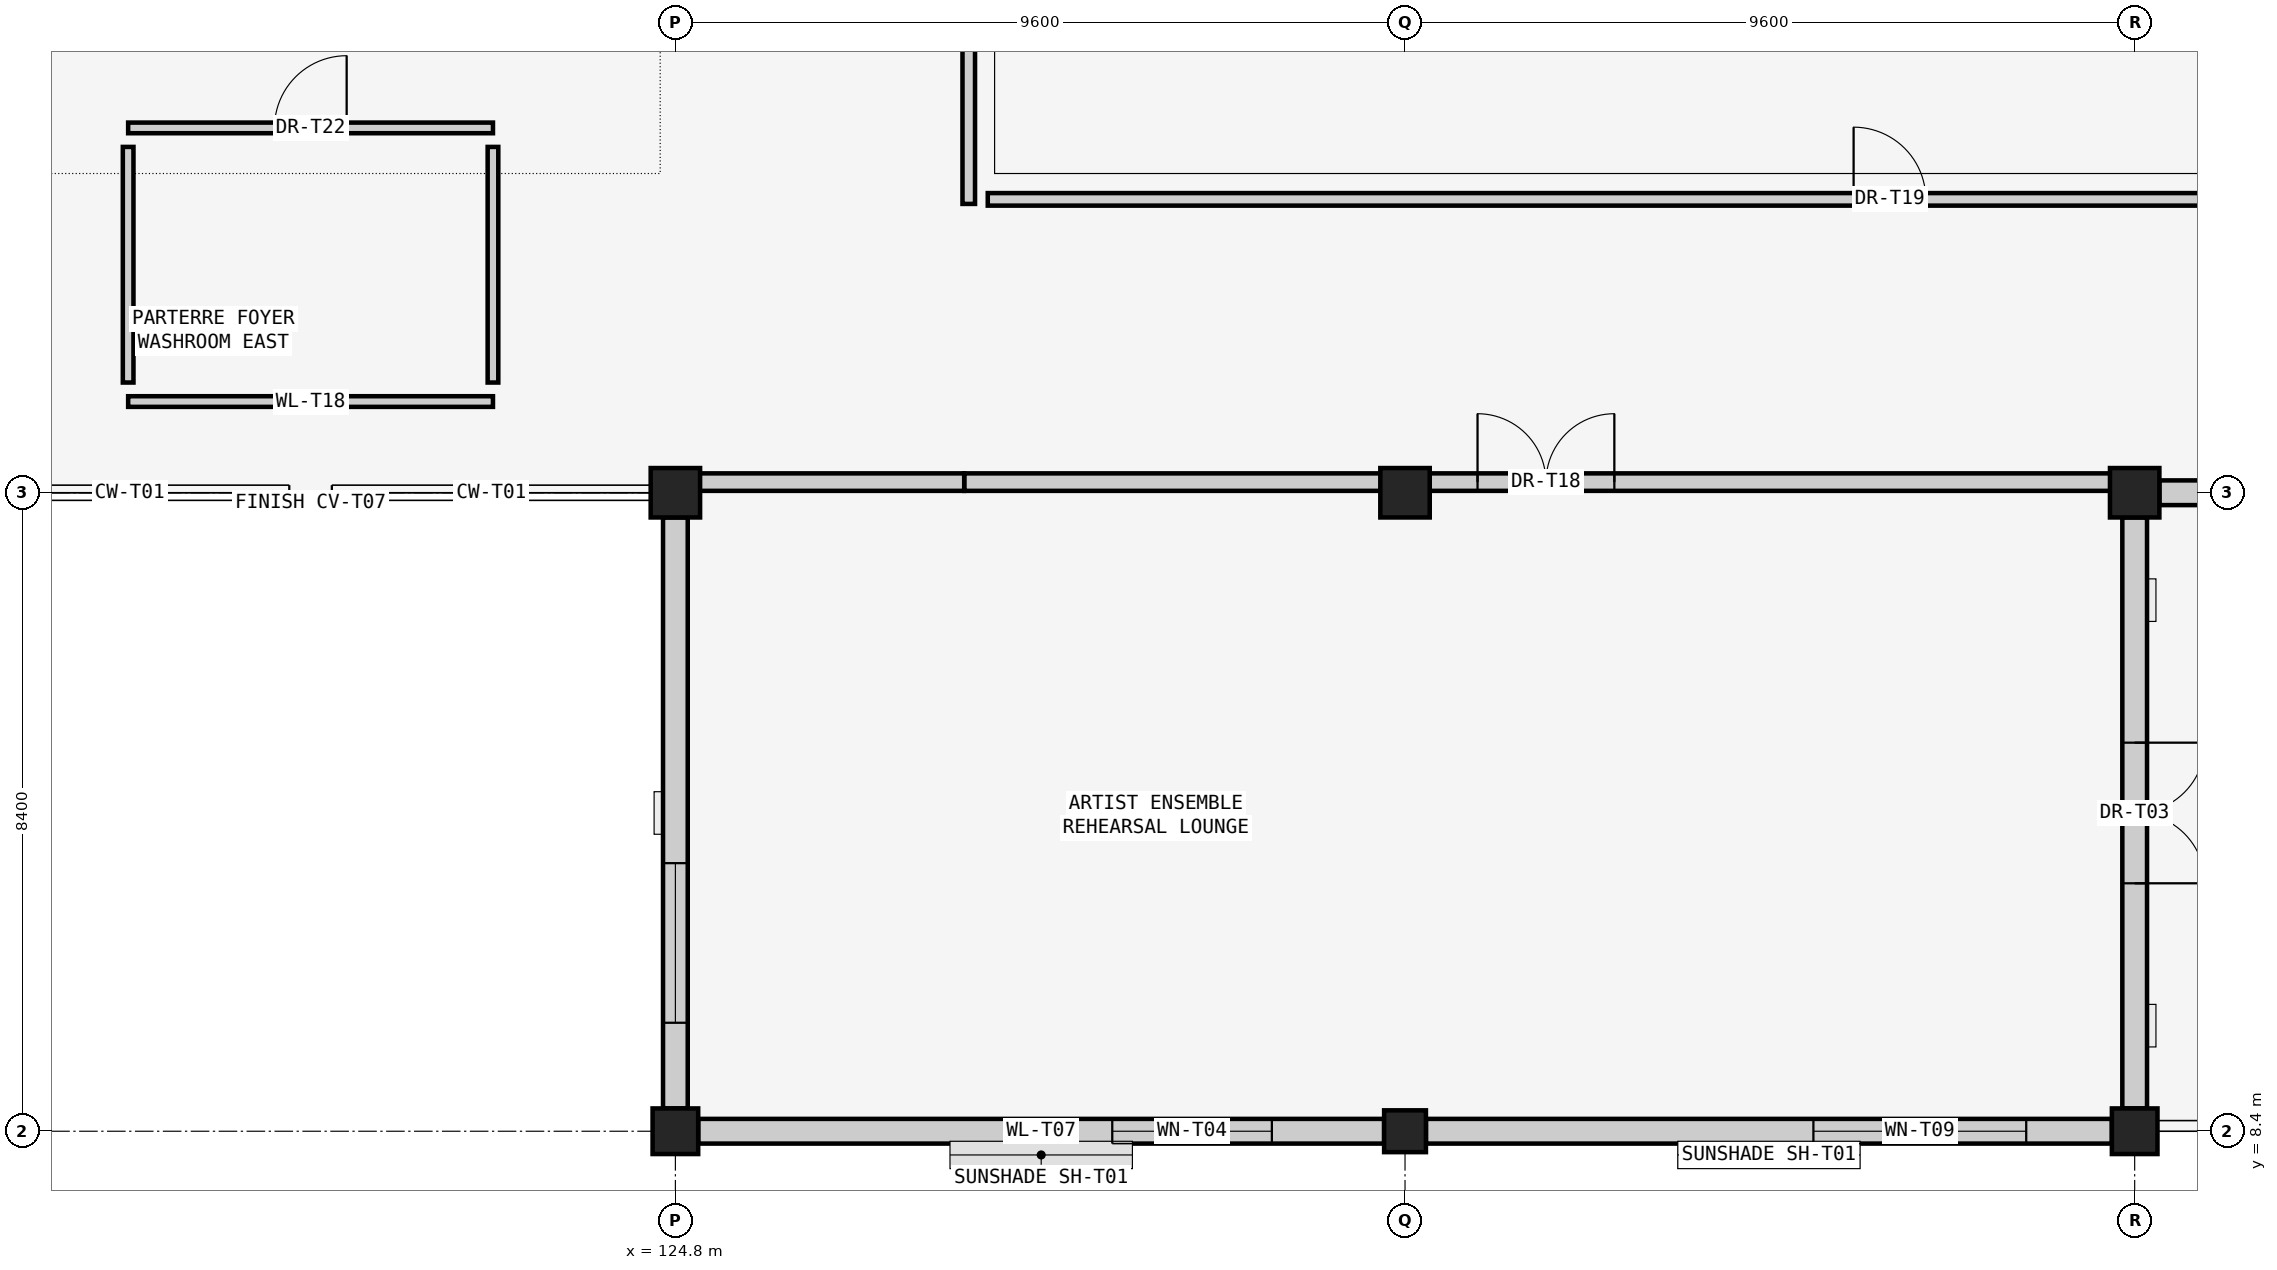
"""IFC4 building model, lengths in metres.
Left out: names, types, materials, properties, quantities, classifications, styles, units other than length and angle.
Written with IfcOpenShell. Run it as: python <this file> out.ifc"""

import sys

from ifc_helpers import new_model, si_unit, direction, frame, frame_2d, origin, origin_2d, place, context, subcontext, project, spatial, rectangle, extrude, element, fill, save


model = new_model("IFC4")
c1 = context("Model", 3, precision=1e-05, world=origin(), true_north=direction((0.0, 1.0)))
c2 = subcontext(c1, "Body", "Model", "MODEL_VIEW")
j1 = project(units=[si_unit("LENGTHUNIT", "METRE"), si_unit("PLANEANGLEUNIT", "RADIAN")], contexts=[c1])
p1 = place(None, origin())
s1 = spatial("IfcSite", under=j1, at=p1, CompositionType="ELEMENT")
p2 = place(p1, origin())
s2 = spatial("IfcBuilding", under=s1, at=p2, CompositionType="ELEMENT")
p3 = place(p2, frame((0.0, 0.0, 5.4)))
s3 = spatial("IfcBuildingStorey", under=s2, at=p3, CompositionType="ELEMENT", Elevation=5.4)
p4 = place(p3, frame((124.8, 8.4, 0.0), z_axis=(0.0, 0.0, 1.0), x_axis=(1.0, 0.0, 0.0)))
e1 = element("IfcColumn", 1, at=p4, inside=s3, PredefinedType="COLUMN", context=c2, shape_type="SweptSolid", body=[
    extrude(rectangle(XDim=0.6, YDim=0.6, at=origin_2d()), origin(), (0.0, 0.0, 1.0), 4.53),
])
p5 = place(p3, frame((124.8, 16.8, 0.0), z_axis=(0.0, 0.0, 1.0), x_axis=(1.0, 0.0, 0.0)))
e2 = element("IfcColumn", 2, at=p5, inside=s3, PredefinedType="COLUMN", context=c2, shape_type="SweptSolid", body=[
    extrude(rectangle(XDim=0.65, YDim=0.65, at=origin_2d()), origin(), (0.0, 0.0, 1.0), 4.53),
])
p6 = place(p3, frame((134.4, 8.4, 0.0), z_axis=(0.0, 0.0, 1.0), x_axis=(1.0, 0.0, 0.0)))
e3 = element("IfcColumn", 3, at=p6, inside=s3, PredefinedType="COLUMN", context=c2, shape_type="SweptSolid", body=[
    extrude(rectangle(XDim=0.55, YDim=0.55, at=origin_2d()), origin(), (0.0, 0.0, 1.0), 4.53),
])
p7 = place(p3, frame((134.4, 16.8, 0.0), z_axis=(0.0, 0.0, 1.0), x_axis=(1.0, 0.0, 0.0)))
e4 = element("IfcColumn", 4, at=p7, inside=s3, PredefinedType="COLUMN", context=c2, shape_type="SweptSolid", body=[
    extrude(rectangle(XDim=0.65, YDim=0.65, at=origin_2d()), origin(), (0.0, 0.0, 1.0), 4.53),
])
p8 = place(p3, frame((144.0, 8.4, 0.0), z_axis=(0.0, 0.0, 1.0), x_axis=(1.0, 0.0, 0.0)))
e5 = element("IfcColumn", 5, at=p8, inside=s3, PredefinedType="COLUMN", context=c2, shape_type="SweptSolid", body=[
    extrude(rectangle(XDim=0.6, YDim=0.6, at=origin_2d()), origin(), (0.0, 0.0, 1.0), 4.53),
])
p9 = place(p3, frame((144.0, 16.8, 0.0), z_axis=(0.0, 0.0, 1.0), x_axis=(1.0, 0.0, 0.0)))
e6 = element("IfcColumn", 6, at=p9, inside=s3, PredefinedType="PILASTER", context=c2, shape_type="SweptSolid", body=[
    extrude(rectangle(XDim=0.65, YDim=0.65, at=origin_2d()), origin(), (0.0, 0.0, 1.0), 4.53),
])
p10 = place(p3, frame((134.125, 8.4, 0.0), z_axis=(0.0, 0.0, 1.0), x_axis=(-1.0, 0.0, 0.0)))
e7 = element("IfcWall", 7, at=p10, inside=s3, PredefinedType="SOLIDWALL", context=c2, shape_type="SweptSolid", body=[
    extrude(rectangle(XDim=9.025, YDim=0.325, at=frame_2d((4.512, 0.0))), origin(), (0.0, 0.0, 1.0), 3.91),
])
p11 = place(p10, frame((1.477, 0.0, 0.9)))
e8 = element("IfcOpeningElement", 8, at=p11, cuts=e7, PredefinedType="OPENING", context=c2, shape_type="SweptSolid", body=[
    extrude(rectangle(XDim=2.1, YDim=2.4, at=frame_2d((1.05, 1.2))), frame((0.0, 0.172, 0.0), z_axis=(0.0, -1.0, 0.0), x_axis=(1.0, 0.0, 0.0)), (0.0, 0.0, 1.0), 0.345),
])
p12 = place(p3, frame((124.8, 8.7, 0.0), z_axis=(0.0, 0.0, 1.0), x_axis=(0.0, 1.0, 0.0)))
e9 = element("IfcWall", 9, at=p12, inside=s3, PredefinedType="SOLIDWALL", context=c2, shape_type="SweptSolid", body=[
    extrude(rectangle(XDim=7.775, YDim=0.325, at=frame_2d((3.888, 0.0))), origin(), (0.0, 0.0, 1.0), 3.91),
])
p13 = place(p12, frame((1.127, 0.0, 0.9)))
e10 = element("IfcOpeningElement", 10, at=p13, cuts=e9, PredefinedType="OPENING", context=c2, shape_type="SweptSolid", body=[
    extrude(rectangle(XDim=2.1, YDim=2.4, at=frame_2d((1.05, 1.2))), frame((0.0, 0.172, 0.0), z_axis=(0.0, -1.0, 0.0), x_axis=(1.0, 0.0, 0.0)), (0.0, 0.0, 1.0), 0.345),
])
p14 = place(p3, frame((143.7, 8.4, 0.0), z_axis=(0.0, 0.0, 1.0), x_axis=(-1.0, 0.0, 0.0)))
e11 = element("IfcWall", 11, at=p14, inside=s3, PredefinedType="SOLIDWALL", context=c2, shape_type="SweptSolid", body=[
    extrude(rectangle(XDim=9.025, YDim=0.325, at=frame_2d((4.512, 0.0))), origin(), (0.0, 0.0, 1.0), 3.91),
])
p15 = place(p14, frame((1.127, 0.0, 1.0)))
e12 = element("IfcOpeningElement", 12, at=p15, cuts=e11, PredefinedType="OPENING", context=c2, shape_type="SweptSolid", body=[
    extrude(rectangle(XDim=2.8, YDim=1.9, at=frame_2d((1.4, 0.95))), frame((0.0, 0.172, 0.0), z_axis=(0.0, -1.0, 0.0), x_axis=(1.0, 0.0, 0.0)), (0.0, 0.0, 1.0), 0.345),
])
p16 = place(p3, frame((144.0, 16.475, 0.0), z_axis=(0.0, 0.0, 1.0), x_axis=(0.0, -1.0, 0.0)))
e13 = element("IfcWall", 13, at=p16, inside=s3, PredefinedType="SOLIDWALL", context=c2, shape_type="SweptSolid", body=[
    extrude(rectangle(XDim=7.775, YDim=0.325, at=frame_2d((3.888, 0.0))), origin(), (0.0, 0.0, 1.0), 3.91),
])
p17 = place(p16, frame((2.963, 0.0, 0.0)))
e14 = element("IfcOpeningElement", 14, at=p17, cuts=e13, PredefinedType="OPENING", context=c2, shape_type="SweptSolid", body=[
    extrude(rectangle(XDim=1.85, YDim=2.3, at=frame_2d((0.925, 1.15))), frame((0.0, 0.172, 0.0), z_axis=(0.0, -1.0, 0.0), x_axis=(1.0, 0.0, 0.0)), (0.0, 0.0, 1.0), 0.345),
])
p18 = place(p3, frame((153.3, 16.8, 0.0), z_axis=(0.0, 0.0, 1.0), x_axis=(-1.0, 0.0, 0.0)))
e15 = element("IfcWall", 15, at=p18, inside=s3, PredefinedType="SOLIDWALL", context=c2, shape_type="SweptSolid", body=[
    extrude(rectangle(XDim=8.975, YDim=0.325, at=frame_2d((4.488, 0.0))), origin(), (0.0, 0.0, 1.0), 3.91),
])
p19 = place(p18, frame((3.562, 0.0, 0.0)))
e16 = element("IfcOpeningElement", 16, at=p19, cuts=e15, PredefinedType="OPENING", context=c2, shape_type="SweptSolid", body=[
    extrude(rectangle(XDim=1.85, YDim=2.3, at=frame_2d((0.925, 1.15))), frame((0.0, 0.172, 0.0), z_axis=(0.0, -1.0, 0.0), x_axis=(1.0, 0.0, 0.0)), (0.0, 0.0, 1.0), 0.345),
])
p20 = place(p3, frame((117.6, 18.0, 0.0), z_axis=(0.0, 0.0, 1.0), x_axis=(1.0, 0.0, 0.0)))
e17 = element("IfcWall", 17, at=p20, inside=s3, PredefinedType="PARTITIONING", context=c2, shape_type="SweptSolid", body=[
    extrude(rectangle(XDim=4.8, YDim=0.14, at=frame_2d((2.4, 0.0))), origin(), (0.0, 0.0, 1.0), 4.32),
])
p21 = place(p3, frame((117.6, 21.6, 0.0), z_axis=(0.0, 0.0, 1.0), x_axis=(1.0, 0.0, 0.0)))
e18 = element("IfcWall", 18, at=p21, inside=s3, PredefinedType="PARTITIONING", context=c2, shape_type="SweptSolid", body=[
    extrude(rectangle(XDim=4.8, YDim=0.14, at=frame_2d((2.4, 0.0))), origin(), (0.0, 0.0, 1.0), 4.32),
])
p22 = place(p21, frame((1.925, 0.0, 0.0)))
e19 = element("IfcOpeningElement", 19, at=p22, cuts=e18, PredefinedType="OPENING", context=c2, shape_type="SweptSolid", body=[
    extrude(rectangle(XDim=0.95, YDim=2.15, at=frame_2d((0.475, 1.075))), frame((0.0, 0.08, 0.0), z_axis=(0.0, -1.0, 0.0), x_axis=(1.0, 0.0, 0.0)), (0.0, 0.0, 1.0), 0.16),
])
for number, where, z_axis, x_axis in (
    (20, (117.6, 18.25, 0.0), (0.0, 0.0, 1.0), (0.0, 1.0, 0.0)),
    (21, (122.4, 18.25, 0.0), (0.0, 0.0, 1.0), (0.0, 1.0, 0.0)),
):
    element("IfcWall", number, at=place(p3, frame(where, z_axis=z_axis, x_axis=x_axis)), inside=s3, PredefinedType="PARTITIONING", context=c2, shape_type="SweptSolid", body=[
        extrude(rectangle(XDim=3.1, YDim=0.14, at=frame_2d((1.55, 0.0))), origin(), (0.0, 0.0, 1.0), 4.32),
    ])
p23 = place(p3, frame((128.66, 20.6, 0.0), z_axis=(0.0, 0.0, 1.0), x_axis=(0.0, 1.0, 0.0)))
e22 = element("IfcWall", 22, at=p23, inside=s3, PredefinedType="PARTITIONING", context=c2, shape_type="SweptSolid", body=[
    extrude(rectangle(XDim=6.0, YDim=0.165, at=frame_2d((3.0, 0.0))), origin(), (0.0, 0.0, 1.0), 4.48),
])
p24 = place(p3, frame((128.91, 20.66, 0.0), z_axis=(0.0, 0.0, 1.0), x_axis=(1.0, 0.0, 0.0)))
e23 = element("IfcWall", 23, at=p24, inside=s3, PredefinedType="PARTITIONING", context=c2, shape_type="SweptSolid", body=[
    extrude(rectangle(XDim=23.734, YDim=0.165, at=frame_2d((11.867, 0.0))), origin(), (0.0, 0.0, 1.0), 4.48),
])
p25 = place(p24, frame((11.392, 0.0, 0.0)))
e24 = element("IfcOpeningElement", 24, at=p25, cuts=e23, PredefinedType="OPENING", context=c2, shape_type="SweptSolid", body=[
    extrude(rectangle(XDim=0.95, YDim=2.15, at=frame_2d((0.475, 1.075))), frame((0.0, 0.093, 0.0), z_axis=(0.0, -1.0, 0.0), x_axis=(1.0, 0.0, 0.0)), (0.0, 0.0, 1.0), 0.185),
])
p26 = place(p3, frame((128.6, 16.94, 0.0), z_axis=(0.0, 0.0, 1.0), x_axis=(1.0, 0.0, 0.0)))
e25 = element("IfcWall", 25, at=p26, inside=s3, PredefinedType="SOLIDWALL", context=c2, shape_type="SweptSolid", body=[
    extrude(rectangle(XDim=15.309, YDim=0.23, at=frame_2d((7.654, 0.0))), origin(), (0.0, 0.0, 1.0), 3.56),
])
p27 = place(p26, frame((6.754, 0.0, 0.0)))
e26 = element("IfcOpeningElement", 26, at=p27, cuts=e25, PredefinedType="OPENING", context=c2, shape_type="SweptSolid", body=[
    extrude(rectangle(XDim=1.8, YDim=2.4, at=frame_2d((0.9, 1.2))), frame((0.0, 0.125, 0.0), z_axis=(0.0, -1.0, 0.0), x_axis=(1.0, 0.0, 0.0)), (0.0, 0.0, 1.0), 0.25),
])
p28 = place(p3, frame((125.0, 16.94, 0.0), z_axis=(0.0, 0.0, 1.0), x_axis=(1.0, 0.0, 0.0)))
e27 = element("IfcWall", 27, at=p28, inside=s3, PredefinedType="SOLIDWALL", context=c2, shape_type="SweptSolid", body=[
    extrude(rectangle(XDim=3.6, YDim=0.23, at=frame_2d((1.8, 0.0))), origin(), (0.0, 0.0, 1.0), 3.66),
])
p29 = place(p11, origin())
e28 = element("IfcWindow", 28, at=p29, inside=s3, PartitioningType="SINGLE_PANEL", PredefinedType="WINDOW", context=c2, shape_type="SweptSolid", body=[
    extrude(rectangle(XDim=2.1, YDim=2.4, at=frame_2d((1.05, 1.2))), frame((0.0, 0.03, 0.0), z_axis=(0.0, -1.0, 0.0), x_axis=(1.0, 0.0, 0.0)), (0.0, 0.0, 1.0), 0.06),
])
fill(e8, e28)
p30 = place(p13, origin())
e29 = element("IfcWindow", 29, at=p30, inside=s3, PartitioningType="SINGLE_PANEL", PredefinedType="WINDOW", context=c2, shape_type="SweptSolid", body=[
    extrude(rectangle(XDim=2.1, YDim=2.4, at=frame_2d((1.05, 1.2))), frame((0.0, 0.03, 0.0), z_axis=(0.0, -1.0, 0.0), x_axis=(1.0, 0.0, 0.0)), (0.0, 0.0, 1.0), 0.06),
])
fill(e10, e29)
p31 = place(p15, origin())
e30 = element("IfcWindow", 30, at=p31, inside=s3, PartitioningType="SINGLE_PANEL", PredefinedType="WINDOW", context=c2, shape_type="SweptSolid", body=[
    extrude(rectangle(XDim=2.8, YDim=1.9, at=frame_2d((1.4, 0.95))), frame((0.0, 0.03, 0.0), z_axis=(0.0, -1.0, 0.0), x_axis=(1.0, 0.0, 0.0)), (0.0, 0.0, 1.0), 0.06),
])
fill(e12, e30)
p32 = place(p17, origin())
e31 = element("IfcDoor", 31, at=p32, inside=s3, OperationType="DOUBLE_DOOR_SINGLE_SWING", PredefinedType="DOOR", context=c2, shape_type="SweptSolid", body=[
    extrude(rectangle(XDim=1.85, YDim=2.3, at=frame_2d((0.925, 1.15))), frame((0.0, 0.025, 0.0), z_axis=(0.0, -1.0, 0.0), x_axis=(1.0, 0.0, 0.0)), (0.0, 0.0, 1.0), 0.05),
])
fill(e14, e31)
p33 = place(p22, origin())
e32 = element("IfcDoor", 32, at=p33, inside=s3, OperationType="SINGLE_SWING_RIGHT", PredefinedType="DOOR", context=c2, shape_type="SweptSolid", body=[
    extrude(rectangle(XDim=0.95, YDim=2.15, at=frame_2d((0.475, 1.075))), frame((0.0, 0.025, 0.0), z_axis=(0.0, -1.0, 0.0), x_axis=(1.0, 0.0, 0.0)), (0.0, 0.0, 1.0), 0.05),
])
fill(e19, e32)
p34 = place(p25, origin())
e33 = element("IfcDoor", 33, at=p34, inside=s3, OperationType="SINGLE_SWING_LEFT", PredefinedType="DOOR", context=c2, shape_type="SweptSolid", body=[
    extrude(rectangle(XDim=0.95, YDim=2.15, at=frame_2d((0.475, 1.075))), frame((0.0, 0.025, 0.0), z_axis=(0.0, -1.0, 0.0), x_axis=(1.0, 0.0, 0.0)), (0.0, 0.0, 1.0), 0.05),
])
fill(e24, e33)
p35 = place(p27, origin())
e34 = element("IfcDoor", 34, at=p35, inside=s3, OperationType="DOUBLE_SWING_LEFT", PredefinedType="DOOR", context=c2, shape_type="SweptSolid", body=[
    extrude(rectangle(XDim=1.8, YDim=2.4, at=frame_2d((0.9, 1.2))), frame((0.0, 0.025, 0.0), z_axis=(0.0, -1.0, 0.0), x_axis=(1.0, 0.0, 0.0)), (0.0, 0.0, 1.0), 0.05),
])
fill(e26, e34)
save(model, sys.argv[1])
